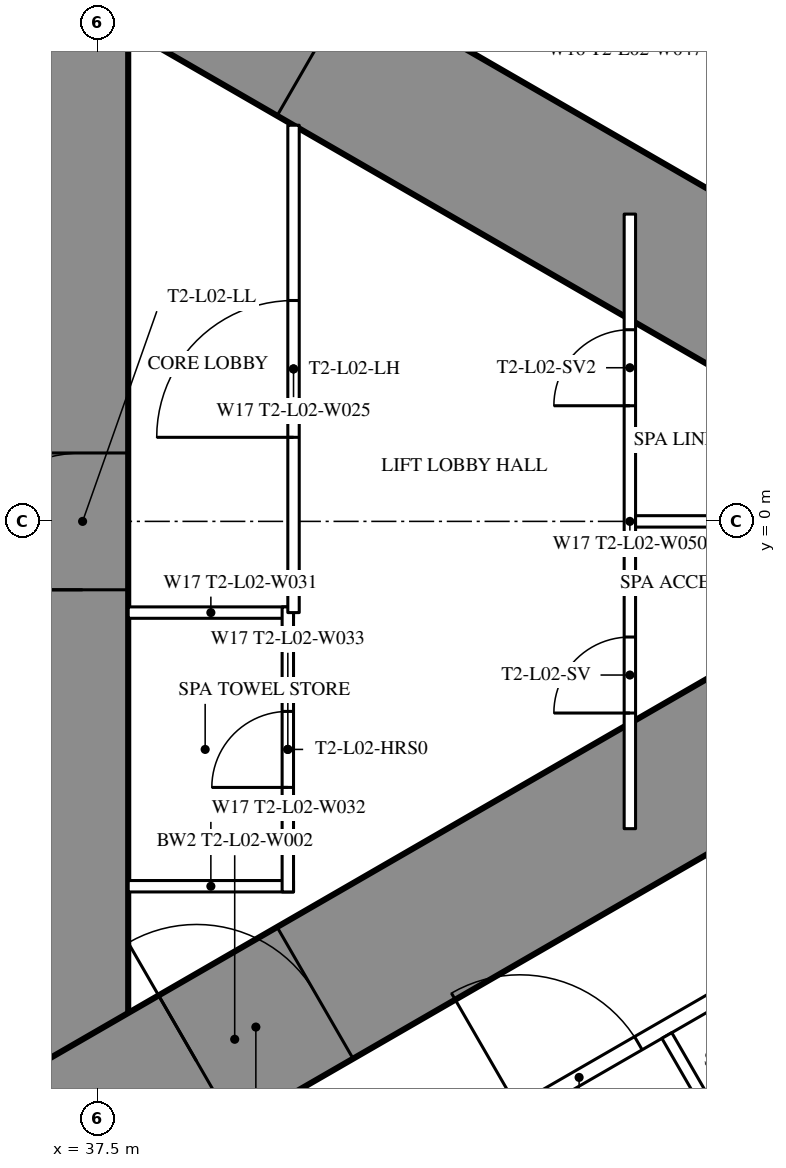
"""IFC4 building model, lengths in metres.
Left out: names, types, materials, properties, quantities, classifications, styles, units other than length and angle.
Written with IfcOpenShell. Run it as: python <this file> out.ifc"""

import sys

from ifc_helpers import new_model, si_unit, direction, frame, frame_2d, origin, place, context, subcontext, project, spatial, rectangle, extrude, element, fill, save


model = new_model("IFC4")
c1 = context("Model", 3, precision=1e-05, world=origin(), true_north=direction((0.0, 1.0)))
c2 = subcontext(c1, "Body", "Model", "MODEL_VIEW")
j1 = project(units=[si_unit("LENGTHUNIT", "METRE"), si_unit("PLANEANGLEUNIT", "RADIAN")], contexts=[c1])
p1 = place(None, origin())
s1 = spatial("IfcSite", under=j1, at=p1, CompositionType="ELEMENT")
p2 = place(p1, origin())
s2 = spatial("IfcBuilding", under=s1, at=p2, CompositionType="ELEMENT")
p3 = place(p2, frame((0.0, 0.0, 12.6)))
s3 = spatial("IfcBuildingStorey", under=s2, at=p3, CompositionType="ELEMENT", Elevation=12.6)
p4 = place(p3, frame((37.3, -8.6, 0.0), z_axis=(0.0, 0.0, 1.0), x_axis=(0.0, 1.0, 0.0)))
e1 = element("IfcWall", 1, at=p4, inside=s3, PredefinedType="SHEAR", context=c2, shape_type="SweptSolid", body=[
    extrude(rectangle(XDim=17.2, YDim=1.2, at=frame_2d((8.6, 0.0))), origin(), (0.0, 0.0, 1.0), 5.4),
])
p5 = place(p4, frame((7.7, 0.0, 0.0)))
e2 = element("IfcOpeningElement", 2, at=p5, cuts=e1, PredefinedType="OPENING", context=c2, shape_type="SweptSolid", body=[
    extrude(rectangle(XDim=1.8, YDim=2.2, at=frame_2d((0.9, 1.1))), frame((0.0, 0.61, 0.0), z_axis=(0.0, -1.0, 0.0), x_axis=(1.0, 0.0, 0.0)), (0.0, 0.0, 1.0), 1.22),
])
p6 = place(p3, frame((27.2, -13.8, 0.0), z_axis=(0.0, 0.0, 1.0), x_axis=(0.866027159892, 0.499996958321, 0.0)))
e3 = element("IfcWall", 3, at=p6, inside=s3, PredefinedType="SHEAR", context=c2, shape_type="SweptSolid", body=[
    extrude(rectangle(XDim=27.947, YDim=2.0, at=frame_2d((13.973, 0.0))), origin(), (0.0, 0.0, 1.0), 5.4),
])
p7 = place(p6, frame((4.6, 0.0, 0.0)))
e4 = element("IfcOpeningElement", 4, at=p7, cuts=e3, PredefinedType="OPENING", context=c2, shape_type="SweptSolid", body=[
    extrude(rectangle(XDim=1.0, YDim=2.2, at=frame_2d((0.5, 1.1))), frame((0.0, 1.01, 0.0), z_axis=(0.0, -1.0, 0.0), x_axis=(1.0, 0.0, 0.0)), (0.0, 0.0, 1.0), 2.02),
])
p8 = place(p6, frame((13.395, 0.0, 0.0)))
e5 = element("IfcOpeningElement", 5, at=p8, cuts=e3, PredefinedType="OPENING", context=c2, shape_type="SweptSolid", body=[
    extrude(rectangle(XDim=1.8, YDim=2.2, at=frame_2d((0.9, 1.1))), frame((0.0, 1.01, 0.0), z_axis=(0.0, -1.0, 0.0), x_axis=(1.0, 0.0, 0.0)), (0.0, 0.0, 1.0), 2.02),
])
p9 = place(p3, frame((27.2, 13.8, 0.0), z_axis=(0.0, 0.0, 1.0), x_axis=(0.866024545924, -0.500001485854, 0.0)))
e6 = element("IfcWall", 6, at=p9, inside=s3, PredefinedType="SHEAR", context=c2, shape_type="SweptSolid", body=[
    extrude(rectangle(XDim=26.534, YDim=2.0, at=frame_2d((13.267, 0.0))), origin(), (0.0, 0.0, 1.0), 5.4),
])
p10 = place(p9, frame((4.6, 0.0, 0.0)))
e7 = element("IfcOpeningElement", 7, at=p10, cuts=e6, PredefinedType="OPENING", context=c2, shape_type="SweptSolid", body=[
    extrude(rectangle(XDim=1.0, YDim=2.2, at=frame_2d((0.5, 1.1))), frame((0.0, 1.01, 0.0), z_axis=(0.0, -1.0, 0.0), x_axis=(1.0, 0.0, 0.0)), (0.0, 0.0, 1.0), 2.02),
])
p11 = place(p9, frame((13.395, 0.0, 0.0)))
e8 = element("IfcOpeningElement", 8, at=p11, cuts=e6, PredefinedType="OPENING", context=c2, shape_type="SweptSolid", body=[
    extrude(rectangle(XDim=1.8, YDim=2.2, at=frame_2d((0.9, 1.1))), frame((0.0, 1.01, 0.0), z_axis=(0.0, -1.0, 0.0), x_axis=(1.0, 0.0, 0.0)), (0.0, 0.0, 1.0), 2.02),
])
p12 = place(p3, frame((38.16, -10.59, 0.0), z_axis=(0.0, 0.0, 1.0), x_axis=(0.866027029586, 0.499997184019, 0.0)))
e9 = element("IfcWall", 9, at=p12, inside=s3, PredefinedType="PARTITIONING", context=c2, shape_type="SweptSolid", body=[
    extrude(rectangle(XDim=21.18, YDim=0.2, at=frame_2d((10.59, 0.0))), origin(), (0.0, 0.0, 1.0), 4.25),
])
p13 = place(p12, frame((14.142, 0.0, 0.0)))
e10 = element("IfcOpeningElement", 10, at=p13, cuts=e9, PredefinedType="OPENING", context=c2, shape_type="SweptSolid", body=[
    extrude(rectangle(XDim=1.8, YDim=2.2, at=frame_2d((0.9, 1.1))), frame((0.0, 0.11, 0.0), z_axis=(0.0, -1.0, 0.0), x_axis=(1.0, 0.0, 0.0)), (0.0, 0.0, 1.0), 0.22),
])
p14 = place(p12, frame((18.183, 0.0, 0.0)))
e11 = element("IfcOpeningElement", 11, at=p14, cuts=e9, PredefinedType="OPENING", context=c2, shape_type="SweptSolid", body=[
    extrude(rectangle(XDim=1.8, YDim=2.2, at=frame_2d((0.9, 1.1))), frame((0.0, 0.11, 0.0), z_axis=(0.0, -1.0, 0.0), x_axis=(1.0, 0.0, 0.0)), (0.0, 0.0, 1.0), 0.22),
])
p15 = place(p12, frame((5.65, 0.0, 0.0)))
e12 = element("IfcOpeningElement", 12, at=p15, cuts=e9, PredefinedType="OPENING", context=c2, shape_type="SweptSolid", body=[
    extrude(rectangle(XDim=1.8, YDim=2.2, at=frame_2d((0.9, 1.1))), frame((0.0, 0.11, 0.0), z_axis=(0.0, -1.0, 0.0), x_axis=(1.0, 0.0, 0.0)), (0.0, 0.0, 1.0), 0.22),
])
p16 = place(p3, frame((37.034, 11.24, 0.0), z_axis=(0.0, 0.0, 1.0), x_axis=(0.866025942536, -0.499999066854, 0.0)))
e13 = element("IfcWall", 13, at=p16, inside=s3, PredefinedType="PARTITIONING", context=c2, shape_type="SweptSolid", body=[
    extrude(rectangle(XDim=22.36, YDim=0.2, at=frame_2d((11.18, 0.0))), origin(), (0.0, 0.0, 1.0), 4.25),
])
p17 = place(p16, frame((19.423, 0.0, 0.0)))
e14 = element("IfcOpeningElement", 14, at=p17, cuts=e13, PredefinedType="OPENING", context=c2, shape_type="SweptSolid", body=[
    extrude(rectangle(XDim=1.8, YDim=2.2, at=frame_2d((0.9, 1.1))), frame((0.0, 0.11, 0.0), z_axis=(0.0, -1.0, 0.0), x_axis=(1.0, 0.0, 0.0)), (0.0, 0.0, 1.0), 0.22),
])
p18 = place(p16, frame((13.274, 0.0, 0.0)))
e15 = element("IfcOpeningElement", 15, at=p18, cuts=e13, PredefinedType="OPENING", context=c2, shape_type="SweptSolid", body=[
    extrude(rectangle(XDim=1.8, YDim=2.2, at=frame_2d((0.9, 1.1))), frame((0.0, 0.11, 0.0), z_axis=(0.0, -1.0, 0.0), x_axis=(1.0, 0.0, 0.0)), (0.0, 0.0, 1.0), 0.22),
])
p19 = place(p16, frame((4.602, 0.0, 0.0)))
e16 = element("IfcOpeningElement", 16, at=p19, cuts=e13, PredefinedType="OPENING", context=c2, shape_type="SweptSolid", body=[
    extrude(rectangle(XDim=1.8, YDim=2.2, at=frame_2d((0.9, 1.1))), frame((0.0, 0.11, 0.0), z_axis=(0.0, -1.0, 0.0), x_axis=(1.0, 0.0, 0.0)), (0.0, 0.0, 1.0), 0.22),
])
for number, where, z_axis, x_axis in (
    (17, (37.9, -1.2, 0.0), (0.0, 0.0, 1.0), (1.0, 0.0, 0.0)),
    (18, (37.9, -4.8, 0.0), (0.0, 0.0, 1.0), (1.0, 0.0, 0.0)),
):
    element("IfcWall", number, at=place(p3, frame(where, z_axis=z_axis, x_axis=x_axis)), inside=s3, PredefinedType="PARTITIONING", context=c2, shape_type="SweptSolid", body=[
        extrude(rectangle(XDim=2.175, YDim=0.15, at=frame_2d((1.087, 0.0))), origin(), (0.0, 0.0, 1.0), 5.15),
    ])
p20 = place(p3, frame((40.0, -4.875, 0.0), z_axis=(0.0, 0.0, 1.0), x_axis=(0.0, 1.0, 0.0)))
e19 = element("IfcWall", 19, at=p20, inside=s3, PredefinedType="PARTITIONING", context=c2, shape_type="SweptSolid", body=[
    extrude(rectangle(XDim=3.75, YDim=0.15, at=frame_2d((1.875, 0.0))), origin(), (0.0, 0.0, 1.0), 5.15),
])
p21 = place(p20, frame((1.375, 0.0, 0.0)))
e20 = element("IfcOpeningElement", 20, at=p21, cuts=e19, PredefinedType="OPENING", context=c2, shape_type="SweptSolid", body=[
    extrude(rectangle(XDim=1.0, YDim=2.2, at=frame_2d((0.5, 1.1))), frame((0.0, 0.085, 0.0), z_axis=(0.0, -1.0, 0.0), x_axis=(1.0, 0.0, 0.0)), (0.0, 0.0, 1.0), 0.17),
])
p22 = place(p3, frame((40.075, -1.2, 0.0), z_axis=(0.0, 0.0, 1.0), x_axis=(0.0, 1.0, 0.0)))
e21 = element("IfcWall", 21, at=p22, inside=s3, PredefinedType="PARTITIONING", context=c2, shape_type="SweptSolid", body=[
    extrude(rectangle(XDim=6.412, YDim=0.15, at=frame_2d((3.206, 0.0))), origin(), (0.0, 0.0, 1.0), 5.15),
])
p23 = place(p22, frame((2.306, 0.0, 0.0)))
e22 = element("IfcOpeningElement", 22, at=p23, cuts=e21, PredefinedType="OPENING", context=c2, shape_type="SweptSolid", body=[
    extrude(rectangle(XDim=1.8, YDim=2.2, at=frame_2d((0.9, 1.1))), frame((0.0, 0.085, 0.0), z_axis=(0.0, -1.0, 0.0), x_axis=(1.0, 0.0, 0.0)), (0.0, 0.0, 1.0), 0.17),
])
p24 = place(p3, frame((44.5, -4.043, 0.0), z_axis=(0.0, 0.0, 1.0), x_axis=(0.0, 1.0, 0.0)))
e23 = element("IfcWall", 23, at=p24, inside=s3, PredefinedType="PARTITIONING", context=c2, shape_type="SweptSolid", body=[
    extrude(rectangle(XDim=8.085, YDim=0.15, at=frame_2d((4.043, 0.0))), origin(), (0.0, 0.0, 1.0), 4.25),
])
p25 = place(p24, frame((1.521, 0.0, 0.0)))
e24 = element("IfcOpeningElement", 24, at=p25, cuts=e23, PredefinedType="OPENING", context=c2, shape_type="SweptSolid", body=[
    extrude(rectangle(XDim=1.0, YDim=2.2, at=frame_2d((0.5, 1.1))), frame((0.0, 0.085, 0.0), z_axis=(0.0, -1.0, 0.0), x_axis=(1.0, 0.0, 0.0)), (0.0, 0.0, 1.0), 0.17),
])
p26 = place(p24, frame((5.564, 0.0, 0.0)))
e25 = element("IfcOpeningElement", 25, at=p26, cuts=e23, PredefinedType="OPENING", context=c2, shape_type="SweptSolid", body=[
    extrude(rectangle(XDim=1.0, YDim=2.2, at=frame_2d((0.5, 1.1))), frame((0.0, 0.085, 0.0), z_axis=(0.0, -1.0, 0.0), x_axis=(1.0, 0.0, 0.0)), (0.0, 0.0, 1.0), 0.17),
])
p27 = place(p3, frame((44.575, 0.0, 0.0), z_axis=(0.0, 0.0, 1.0), x_axis=(1.0, 0.0, 0.0)))
e26 = element("IfcWall", 26, at=p27, inside=s3, PredefinedType="PARTITIONING", context=c2, shape_type="SweptSolid", body=[
    extrude(rectangle(XDim=7.727, YDim=0.15, at=frame_2d((3.864, 0.0))), origin(), (0.0, 0.0, 1.0), 4.15),
])
p28 = place(p3, frame((44.986, -6.764, 0.0), z_axis=(0.0, 0.0, 1.0), x_axis=(0.499982560684, -0.866035472144, 0.0)))
e27 = element("IfcWall", 27, at=p28, inside=s3, PredefinedType="PARTITIONING", context=c2, shape_type="SweptSolid", body=[
    extrude(rectangle(XDim=2.275, YDim=0.15, at=frame_2d((1.137, 0.0))), origin(), (0.0, 0.0, 1.0), 5.15),
])
p29 = place(p15, origin())
e28 = element("IfcDoor", 28, at=p29, inside=s3, OperationType="DOUBLE_DOOR_SINGLE_SWING", PredefinedType="DOOR", context=c2, shape_type="SweptSolid", body=[
    extrude(rectangle(XDim=1.8, YDim=2.2, at=frame_2d((0.9, 1.1))), frame((0.0, 0.025, 0.0), z_axis=(0.0, -1.0, 0.0), x_axis=(1.0, 0.0, 0.0)), (0.0, 0.0, 1.0), 0.05),
])
fill(e12, e28)
p30 = place(p21, origin())
e29 = element("IfcDoor", 29, at=p30, inside=s3, OperationType="SINGLE_SWING_LEFT", PredefinedType="DOOR", context=c2, shape_type="SweptSolid", body=[
    extrude(rectangle(XDim=1.0, YDim=2.2, at=frame_2d((0.5, 1.1))), frame((0.0, 0.025, 0.0), z_axis=(0.0, -1.0, 0.0), x_axis=(1.0, 0.0, 0.0)), (0.0, 0.0, 1.0), 0.05),
])
fill(e20, e29)
p31 = place(p23, origin())
e30 = element("IfcDoor", 30, at=p31, inside=s3, OperationType="DOUBLE_DOOR_SINGLE_SWING", PredefinedType="DOOR", context=c2, shape_type="SweptSolid", body=[
    extrude(rectangle(XDim=1.8, YDim=2.2, at=frame_2d((0.9, 1.1))), frame((0.0, 0.025, 0.0), z_axis=(0.0, -1.0, 0.0), x_axis=(1.0, 0.0, 0.0)), (0.0, 0.0, 1.0), 0.05),
])
fill(e22, e30)
p32 = place(p25, origin())
e31 = element("IfcDoor", 31, at=p32, inside=s3, OperationType="SINGLE_SWING_LEFT", PredefinedType="DOOR", context=c2, shape_type="SweptSolid", body=[
    extrude(rectangle(XDim=1.0, YDim=2.2, at=frame_2d((0.5, 1.1))), frame((0.0, 0.025, 0.0), z_axis=(0.0, -1.0, 0.0), x_axis=(1.0, 0.0, 0.0)), (0.0, 0.0, 1.0), 0.05),
])
fill(e24, e31)
p33 = place(p26, origin())
e32 = element("IfcDoor", 32, at=p33, inside=s3, OperationType="SINGLE_SWING_LEFT", PredefinedType="DOOR", context=c2, shape_type="SweptSolid", body=[
    extrude(rectangle(XDim=1.0, YDim=2.2, at=frame_2d((0.5, 1.1))), frame((0.0, 0.025, 0.0), z_axis=(0.0, -1.0, 0.0), x_axis=(1.0, 0.0, 0.0)), (0.0, 0.0, 1.0), 0.05),
])
fill(e25, e32)
p34 = place(p8, origin())
e33 = element("IfcDoor", 33, at=p34, inside=s3, OperationType="DOUBLE_DOOR_SINGLE_SWING", PredefinedType="DOOR", context=c2, shape_type="SweptSolid", body=[
    extrude(rectangle(XDim=1.8, YDim=2.2, at=frame_2d((0.9, 1.1))), frame((0.0, 0.025, 0.0), z_axis=(0.0, -1.0, 0.0), x_axis=(1.0, 0.0, 0.0)), (0.0, 0.0, 1.0), 0.05),
])
fill(e5, e33)
p35 = place(p5, origin())
e34 = element("IfcDoor", 34, at=p35, inside=s3, OperationType="DOUBLE_DOOR_SINGLE_SWING", PredefinedType="DOOR", context=c2, shape_type="SweptSolid", body=[
    extrude(rectangle(XDim=1.8, YDim=2.2, at=frame_2d((0.9, 1.1))), frame((0.0, 0.025, 0.0), z_axis=(0.0, -1.0, 0.0), x_axis=(1.0, 0.0, 0.0)), (0.0, 0.0, 1.0), 0.05),
])
fill(e2, e34)
save(model, sys.argv[1])
